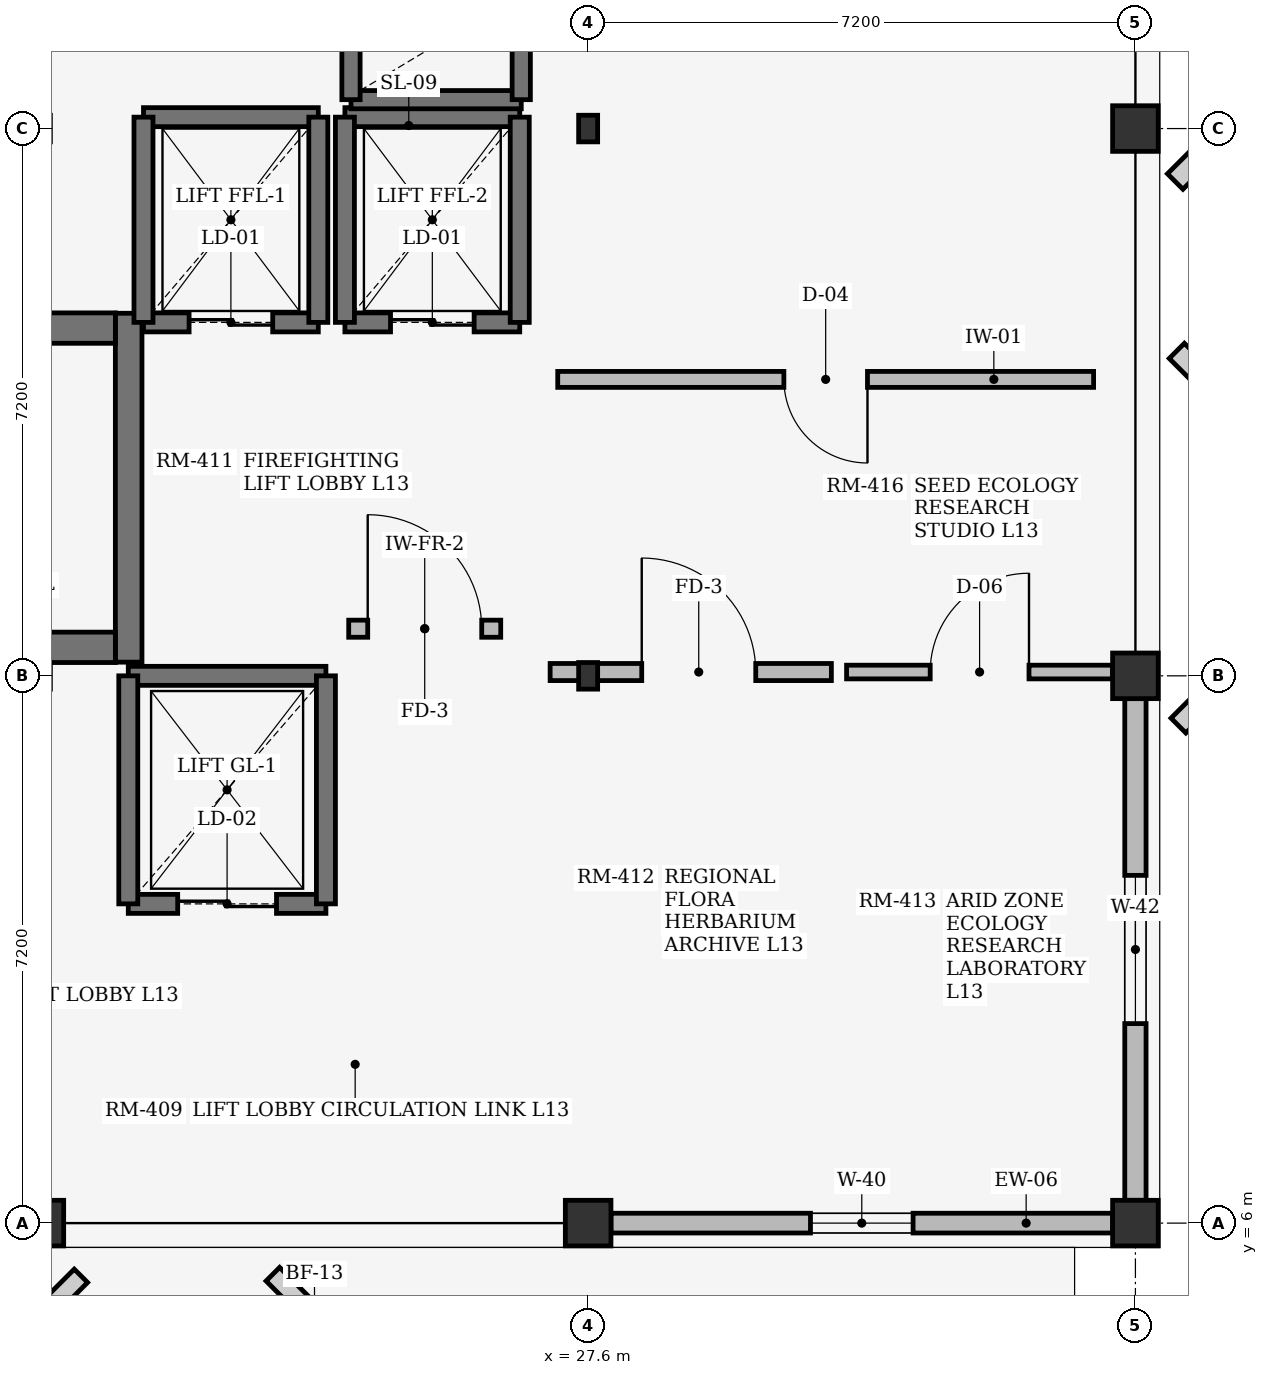
"""IFC4 building model, lengths in metres.
Left out: names, types, materials, properties, quantities, classifications, styles, units other than length and angle.
Written with IfcOpenShell. Run it as: python <this file> out.ifc"""

import sys

from ifc_helpers import new_model, si_unit, direction, frame, frame_2d, origin, origin_2d, place, context, subcontext, project, spatial, rectangle, i_section, extrude, element, fill, save


model = new_model("IFC4")
c1 = context("Model", 3, precision=1e-05, world=origin(), true_north=direction((0.0, 1.0)))
c2 = subcontext(c1, "Body", "Model", "MODEL_VIEW")
j1 = project(units=[si_unit("LENGTHUNIT", "METRE"), si_unit("PLANEANGLEUNIT", "RADIAN")], contexts=[c1])
p1 = place(None, origin())
s1 = spatial("IfcSite", under=j1, at=p1, CompositionType="ELEMENT")
p2 = place(p1, origin())
s2 = spatial("IfcBuilding", under=s1, at=p2, CompositionType="ELEMENT")
p3 = place(p2, frame((0.0, 0.0, 52.2)))
s3 = spatial("IfcBuildingStorey", under=s2, at=p3, CompositionType="ELEMENT", Elevation=52.2)
for number, where, z_axis, x_axis in (
    (1, (20.4, 6.0, 0.0), (0.0, 0.0, 1.0), (1.0, 0.0, 0.0)),
    (2, (27.6, 6.0, 0.0), (0.0, 0.0, 1.0), (1.0, 0.0, 0.0)),
):
    element("IfcColumn", number, at=place(p3, frame(where, z_axis=z_axis, x_axis=x_axis)), inside=s3, PredefinedType="COLUMN", context=c2, shape_type="SweptSolid", body=[
        extrude(rectangle(XDim=0.6, YDim=0.6, at=origin_2d()), origin(), (0.0, 0.0, 1.0), 3.705),
    ])
for number, where, z_axis, x_axis in (
    (3, (27.6, 13.2, 0.0), (0.0, 0.0, 1.0), (1.0, 0.0, 0.0)),
    (4, (27.6, 20.4, 0.0), (0.0, 0.0, 1.0), (1.0, 0.0, 0.0)),
):
    element("IfcColumn", number, at=place(p3, frame(where, z_axis=z_axis, x_axis=x_axis)), inside=s3, PredefinedType="COLUMN", context=c2, shape_type="SweptSolid", body=[
        extrude(i_section(OverallWidth=0.25, OverallDepth=0.35, WebThickness=0.01, FlangeThickness=0.012, at=origin_2d()), origin(), (0.0, 0.0, 1.0), 3.705),
    ])
for number, where, z_axis, x_axis in (
    (5, (34.8, 6.0, 0.0), (0.0, 0.0, 1.0), (1.0, 0.0, 0.0)),
    (6, (34.8, 13.2, 0.0), (0.0, 0.0, 1.0), (1.0, 0.0, 0.0)),
    (7, (34.8, 20.4, 0.0), (0.0, 0.0, 1.0), (1.0, 0.0, 0.0)),
):
    element("IfcColumn", number, at=place(p3, frame(where, z_axis=z_axis, x_axis=x_axis)), inside=s3, PredefinedType="COLUMN", context=c2, shape_type="SweptSolid", body=[
        extrude(rectangle(XDim=0.6, YDim=0.6, at=origin_2d()), origin(), (0.0, 0.0, 1.0), 3.705),
    ])
p4 = place(p3, frame((27.9, 6.0, 0.0), z_axis=(0.0, 0.0, 1.0), x_axis=(1.0, 0.0, 0.0)))
e8 = element("IfcWall", 8, at=p4, inside=s3, PredefinedType="STANDARD", context=c2, shape_type="SweptSolid", body=[
    extrude(rectangle(XDim=6.6, YDim=0.26, at=frame_2d((3.3, 0.0))), origin(), (0.0, 0.0, 1.0), 3.285),
])
p5 = place(p4, frame((2.625, 0.0, 0.75)))
e9 = element("IfcOpeningElement", 9, at=p5, cuts=e8, PredefinedType="OPENING", context=c2, shape_type="SweptSolid", body=[
    extrude(rectangle(XDim=1.35, YDim=1.5, at=frame_2d((0.675, 0.75))), frame((0.0, 0.14, 0.0), z_axis=(0.0, -1.0, 0.0), x_axis=(1.0, 0.0, 0.0)), (0.0, 0.0, 1.0), 0.28),
])
p6 = place(p3, frame((34.8, 6.3, 0.0), z_axis=(0.0, 0.0, 1.0), x_axis=(0.0, 1.0, 0.0)))
e10 = element("IfcWall", 10, at=p6, inside=s3, PredefinedType="STANDARD", context=c2, shape_type="SweptSolid", body=[
    extrude(rectangle(XDim=6.6, YDim=0.28, at=frame_2d((3.3, 0.0))), origin(), (0.0, 0.0, 1.0), 3.285),
])
p7 = place(p6, frame((2.325, 0.0, 0.75)))
e11 = element("IfcOpeningElement", 11, at=p7, cuts=e10, PredefinedType="OPENING", context=c2, shape_type="SweptSolid", body=[
    extrude(rectangle(XDim=1.95, YDim=1.5, at=frame_2d((0.975, 0.75))), frame((0.0, 0.15, 0.0), z_axis=(0.0, -1.0, 0.0), x_axis=(1.0, 0.0, 0.0)), (0.0, 0.0, 1.0), 0.3),
])
p8 = place(p3, frame((21.555, 13.38, 0.0), z_axis=(0.0, 0.0, 1.0), x_axis=(0.0, 1.0, 0.0)))
e12 = element("IfcWall", 12, at=p8, inside=s3, PredefinedType="SHEAR", context=c2, shape_type="SweptSolid", body=[
    extrude(rectangle(XDim=4.59, YDim=0.35, at=frame_2d((2.295, 0.0))), origin(), (0.0, 0.0, 1.0), 3.705),
])
for number, where, z_axis, x_axis in (
    (13, (13.4, 13.575, 0.0), (0.0, 0.0, 1.0), (1.0, 0.0, 0.0)),
    (14, (13.4, 17.775, 0.0), (0.0, 0.0, 1.0), (1.0, 0.0, 0.0)),
):
    element("IfcWall", number, at=place(p3, frame(where, z_axis=z_axis, x_axis=x_axis)), inside=s3, PredefinedType="SHEAR", context=c2, shape_type="SweptSolid", body=[
        extrude(rectangle(XDim=7.98, YDim=0.4, at=frame_2d((3.99, 0.0))), origin(), (0.0, 0.0, 1.0), 3.705),
    ])
p9 = place(p3, frame((21.75, 17.85, 0.0), z_axis=(0.0, 0.0, 1.0), x_axis=(1.0, 0.0, 0.0)))
e15 = element("IfcWall", 15, at=p9, inside=s3, PredefinedType="SHEAR", context=c2, shape_type="SweptSolid", body=[
    extrude(rectangle(XDim=2.3, YDim=0.25, at=frame_2d((1.15, 0.0))), origin(), (0.0, 0.0, 1.0), 3.705),
])
p10 = place(p9, frame((0.6, 0.0, 0.0)))
e16 = element("IfcOpeningElement", 16, at=p10, cuts=e15, PredefinedType="OPENING", context=c2, shape_type="SweptSolid", body=[
    extrude(rectangle(XDim=1.1, YDim=2.2, at=frame_2d((0.55, 1.1))), frame((0.0, 0.135, 0.0), z_axis=(0.0, -1.0, 0.0), x_axis=(1.0, 0.0, 0.0)), (0.0, 0.0, 1.0), 0.27),
])
p11 = place(p3, frame((21.75, 20.55, 0.0), z_axis=(0.0, 0.0, 1.0), x_axis=(1.0, 0.0, 0.0)))
e17 = element("IfcWall", 17, at=p11, inside=s3, PredefinedType="SHEAR", context=c2, shape_type="SweptSolid", body=[
    extrude(rectangle(XDim=2.3, YDim=0.25, at=frame_2d((1.15, 0.0))), origin(), (0.0, 0.0, 1.0), 3.705),
])
for number, where, z_axis, x_axis in (
    (18, (21.75, 17.85, 0.0), (0.0, 0.0, 1.0), (0.0, 1.0, 0.0)),
    (19, (24.05, 17.85, 0.0), (0.0, 0.0, 1.0), (0.0, 1.0, 0.0)),
):
    element("IfcWall", number, at=place(p3, frame(where, z_axis=z_axis, x_axis=x_axis)), inside=s3, PredefinedType="SHEAR", context=c2, shape_type="SweptSolid", body=[
        extrude(rectangle(XDim=2.7, YDim=0.25, at=frame_2d((1.35, 0.0))), origin(), (0.0, 0.0, 1.0), 3.705),
    ])
p12 = place(p3, frame((24.4, 17.85, 0.0), z_axis=(0.0, 0.0, 1.0), x_axis=(1.0, 0.0, 0.0)))
e20 = element("IfcWall", 20, at=p12, inside=s3, PredefinedType="SHEAR", context=c2, shape_type="SweptSolid", body=[
    extrude(rectangle(XDim=2.3, YDim=0.25, at=frame_2d((1.15, 0.0))), origin(), (0.0, 0.0, 1.0), 3.705),
])
p13 = place(p12, frame((0.6, 0.0, 0.0)))
e21 = element("IfcOpeningElement", 21, at=p13, cuts=e20, PredefinedType="OPENING", context=c2, shape_type="SweptSolid", body=[
    extrude(rectangle(XDim=1.1, YDim=2.2, at=frame_2d((0.55, 1.1))), frame((0.0, 0.135, 0.0), z_axis=(0.0, -1.0, 0.0), x_axis=(1.0, 0.0, 0.0)), (0.0, 0.0, 1.0), 0.27),
])
p14 = place(p3, frame((24.4, 20.55, 0.0), z_axis=(0.0, 0.0, 1.0), x_axis=(1.0, 0.0, 0.0)))
e22 = element("IfcWall", 22, at=p14, inside=s3, PredefinedType="SHEAR", context=c2, shape_type="SweptSolid", body=[
    extrude(rectangle(XDim=2.3, YDim=0.25, at=frame_2d((1.15, 0.0))), origin(), (0.0, 0.0, 1.0), 3.705),
])
for number, where, z_axis, x_axis in (
    (23, (24.4, 17.85, 0.0), (0.0, 0.0, 1.0), (0.0, 1.0, 0.0)),
    (24, (26.7, 17.85, 0.0), (0.0, 0.0, 1.0), (0.0, 1.0, 0.0)),
):
    element("IfcWall", number, at=place(p3, frame(where, z_axis=z_axis, x_axis=x_axis)), inside=s3, PredefinedType="SHEAR", context=c2, shape_type="SweptSolid", body=[
        extrude(rectangle(XDim=2.7, YDim=0.25, at=frame_2d((1.35, 0.0))), origin(), (0.0, 0.0, 1.0), 3.705),
    ])
p15 = place(p3, frame((21.55, 10.2, 0.0), z_axis=(0.0, 0.0, 1.0), x_axis=(1.0, 0.0, 0.0)))
e25 = element("IfcWall", 25, at=p15, inside=s3, PredefinedType="SHEAR", context=c2, shape_type="SweptSolid", body=[
    extrude(rectangle(XDim=2.6, YDim=0.25, at=frame_2d((1.3, 0.0))), origin(), (0.0, 0.0, 1.0), 3.705),
])
p16 = place(p15, frame((0.65, 0.0, 0.0)))
e26 = element("IfcOpeningElement", 26, at=p16, cuts=e25, PredefinedType="OPENING", context=c2, shape_type="SweptSolid", body=[
    extrude(rectangle(XDim=1.3, YDim=2.25, at=frame_2d((0.65, 1.125))), frame((0.0, 0.135, 0.0), z_axis=(0.0, -1.0, 0.0), x_axis=(1.0, 0.0, 0.0)), (0.0, 0.0, 1.0), 0.27),
])
p17 = place(p3, frame((21.55, 13.2, 0.0), z_axis=(0.0, 0.0, 1.0), x_axis=(1.0, 0.0, 0.0)))
e27 = element("IfcWall", 27, at=p17, inside=s3, PredefinedType="SHEAR", context=c2, shape_type="SweptSolid", body=[
    extrude(rectangle(XDim=2.6, YDim=0.25, at=frame_2d((1.3, 0.0))), origin(), (0.0, 0.0, 1.0), 3.705),
])
for number, where, z_axis, x_axis in (
    (28, (21.55, 10.2, 0.0), (0.0, 0.0, 1.0), (0.0, 1.0, 0.0)),
    (29, (24.15, 10.2, 0.0), (0.0, 0.0, 1.0), (0.0, 1.0, 0.0)),
):
    element("IfcWall", number, at=place(p3, frame(where, z_axis=z_axis, x_axis=x_axis)), inside=s3, PredefinedType="SHEAR", context=c2, shape_type="SweptSolid", body=[
        extrude(rectangle(XDim=3.0, YDim=0.25, at=frame_2d((1.5, 0.0))), origin(), (0.0, 0.0, 1.0), 3.705),
    ])
p18 = place(p3, frame((24.48, 20.78, 0.0), z_axis=(0.0, 0.0, 1.0), x_axis=(1.0, 0.0, 0.0)))
e30 = element("IfcWall", 30, at=p18, inside=s3, PredefinedType="SHEAR", context=c2, shape_type="SweptSolid", body=[
    extrude(rectangle(XDim=2.24, YDim=0.24, at=frame_2d((1.12, 0.0))), origin(), (0.0, 0.0, 1.0), 3.705),
])
for number, where, z_axis, x_axis in (
    (31, (24.48, 20.78, 0.0), (0.0, 0.0, 1.0), (0.0, 1.0, 0.0)),
    (32, (26.72, 20.78, 0.0), (0.0, 0.0, 1.0), (0.0, 1.0, 0.0)),
):
    element("IfcWall", number, at=place(p3, frame(where, z_axis=z_axis, x_axis=x_axis)), inside=s3, PredefinedType="SHEAR", context=c2, shape_type="SweptSolid", body=[
        extrude(rectangle(XDim=2.94, YDim=0.24, at=frame_2d((1.47, 0.0))), origin(), (0.0, 0.0, 1.0), 3.705),
    ])
p19 = place(p3, frame((24.45, 13.82, 0.0), z_axis=(0.0, 0.0, 1.0), x_axis=(1.0, 0.0, 0.0)))
e33 = element("IfcWall", 33, at=p19, inside=s3, PredefinedType="SOLIDWALL", context=c2, shape_type="SweptSolid", body=[
    extrude(rectangle(XDim=2.0, YDim=0.225, at=frame_2d((1.0, 0.0))), origin(), (0.0, 0.0, 1.0), 3.685),
])
p20 = place(p19, frame((0.25, 0.0, 0.0)))
e34 = element("IfcOpeningElement", 34, at=p20, cuts=e33, PredefinedType="OPENING", context=c2, shape_type="SweptSolid", body=[
    extrude(rectangle(XDim=1.5, YDim=2.2, at=frame_2d((0.75, 1.1))), frame((0.0, 0.123, 0.0), z_axis=(0.0, -1.0, 0.0), x_axis=(1.0, 0.0, 0.0)), (0.0, 0.0, 1.0), 0.245),
])
p21 = place(p3, frame((27.2, 17.1, 0.0), z_axis=(0.0, 0.0, 1.0), x_axis=(1.0, 0.0, 0.0)))
e35 = element("IfcWall", 35, at=p21, inside=s3, PredefinedType="PARTITIONING", context=c2, shape_type="SweptSolid", body=[
    extrude(rectangle(XDim=7.05, YDim=0.21, at=frame_2d((3.525, 0.0))), origin(), (0.0, 0.0, 1.0), 3.685),
])
p22 = place(p21, frame((2.975, 0.0, 0.0)))
e36 = element("IfcOpeningElement", 36, at=p22, cuts=e35, PredefinedType="OPENING", context=c2, shape_type="SweptSolid", body=[
    extrude(rectangle(XDim=1.1, YDim=2.2, at=frame_2d((0.55, 1.1))), frame((0.0, 0.115, 0.0), z_axis=(0.0, -1.0, 0.0), x_axis=(1.0, 0.0, 0.0)), (0.0, 0.0, 1.0), 0.23),
])
p23 = place(p3, frame((27.1, 13.25, 0.0), z_axis=(0.0, 0.0, 1.0), x_axis=(1.0, 0.0, 0.0)))
e37 = element("IfcWall", 37, at=p23, inside=s3, PredefinedType="SOLIDWALL", context=c2, shape_type="SweptSolid", body=[
    extrude(rectangle(XDim=3.7, YDim=0.225, at=frame_2d((1.85, 0.0))), origin(), (0.0, 0.0, 1.0), 3.295),
])
p24 = place(p23, frame((1.205, 0.0, 0.0)))
e38 = element("IfcOpeningElement", 38, at=p24, cuts=e37, PredefinedType="OPENING", context=c2, shape_type="SweptSolid", body=[
    extrude(rectangle(XDim=1.5, YDim=2.2, at=frame_2d((0.75, 1.1))), frame((0.0, 0.123, 0.0), z_axis=(0.0, -1.0, 0.0), x_axis=(1.0, 0.0, 0.0)), (0.0, 0.0, 1.0), 0.245),
])
p25 = place(p3, frame((31.0, 13.25, 0.0), z_axis=(0.0, 0.0, 1.0), x_axis=(1.0, 0.0, 0.0)))
e39 = element("IfcWall", 39, at=p25, inside=s3, PredefinedType="PARTITIONING", context=c2, shape_type="SweptSolid", body=[
    extrude(rectangle(XDim=3.5, YDim=0.18, at=frame_2d((1.75, 0.0))), origin(), (0.0, 0.0, 1.0), 3.295),
])
p26 = place(p25, frame((1.1, 0.0, 0.0)))
e40 = element("IfcOpeningElement", 40, at=p26, cuts=e39, PredefinedType="OPENING", context=c2, shape_type="SweptSolid", body=[
    extrude(rectangle(XDim=1.3, YDim=2.2, at=frame_2d((0.65, 1.1))), frame((0.0, 0.1, 0.0), z_axis=(0.0, -1.0, 0.0), x_axis=(1.0, 0.0, 0.0)), (0.0, 0.0, 1.0), 0.2),
])
p27 = place(p5, origin())
e41 = element("IfcWindow", 41, at=p27, inside=s3, PartitioningType="SINGLE_PANEL", PredefinedType="WINDOW", context=c2, shape_type="SweptSolid", body=[
    extrude(rectangle(XDim=1.35, YDim=1.5, at=frame_2d((0.675, 0.75))), frame((0.0, 0.03, 0.0), z_axis=(0.0, -1.0, 0.0), x_axis=(1.0, 0.0, 0.0)), (0.0, 0.0, 1.0), 0.06),
])
fill(e9, e41)
p28 = place(p7, origin())
e42 = element("IfcWindow", 42, at=p28, inside=s3, PartitioningType="SINGLE_PANEL", PredefinedType="WINDOW", context=c2, shape_type="SweptSolid", body=[
    extrude(rectangle(XDim=1.95, YDim=1.5, at=frame_2d((0.975, 0.75))), frame((0.0, 0.03, 0.0), z_axis=(0.0, -1.0, 0.0), x_axis=(1.0, 0.0, 0.0)), (0.0, 0.0, 1.0), 0.06),
])
fill(e11, e42)
p29 = place(p10, origin())
e43 = element("IfcDoor", 43, at=p29, inside=s3, OperationType="DOUBLE_DOOR_SLIDING", PredefinedType="DOOR", context=c2, shape_type="SweptSolid", body=[
    extrude(rectangle(XDim=1.1, YDim=2.2, at=frame_2d((0.55, 1.1))), frame((0.0, 0.025, 0.0), z_axis=(0.0, -1.0, 0.0), x_axis=(1.0, 0.0, 0.0)), (0.0, 0.0, 1.0), 0.05),
])
fill(e16, e43)
p30 = place(p13, origin())
e44 = element("IfcDoor", 44, at=p30, inside=s3, OperationType="DOUBLE_DOOR_SLIDING", PredefinedType="DOOR", context=c2, shape_type="SweptSolid", body=[
    extrude(rectangle(XDim=1.1, YDim=2.2, at=frame_2d((0.55, 1.1))), frame((0.0, 0.025, 0.0), z_axis=(0.0, -1.0, 0.0), x_axis=(1.0, 0.0, 0.0)), (0.0, 0.0, 1.0), 0.05),
])
fill(e21, e44)
p31 = place(p16, origin())
e45 = element("IfcDoor", 45, at=p31, inside=s3, OperationType="DOUBLE_DOOR_SLIDING", PredefinedType="DOOR", context=c2, shape_type="SweptSolid", body=[
    extrude(rectangle(XDim=1.3, YDim=2.25, at=frame_2d((0.65, 1.125))), frame((0.0, 0.025, 0.0), z_axis=(0.0, -1.0, 0.0), x_axis=(1.0, 0.0, 0.0)), (0.0, 0.0, 1.0), 0.05),
])
fill(e26, e45)
p32 = place(p20, origin())
e46 = element("IfcDoor", 46, at=p32, inside=s3, OperationType="SINGLE_SWING_LEFT", PredefinedType="DOOR", context=c2, shape_type="SweptSolid", body=[
    extrude(rectangle(XDim=1.5, YDim=2.2, at=frame_2d((0.75, 1.1))), frame((0.0, 0.025, 0.0), z_axis=(0.0, -1.0, 0.0), x_axis=(1.0, 0.0, 0.0)), (0.0, 0.0, 1.0), 0.05),
])
fill(e34, e46)
p33 = place(p22, origin())
e47 = element("IfcDoor", 47, at=p33, inside=s3, OperationType="SINGLE_SWING_RIGHT", PredefinedType="DOOR", context=c2, shape_type="SweptSolid", body=[
    extrude(rectangle(XDim=1.1, YDim=2.2, at=frame_2d((0.55, 1.1))), frame((0.0, 0.025, 0.0), z_axis=(0.0, -1.0, 0.0), x_axis=(1.0, 0.0, 0.0)), (0.0, 0.0, 1.0), 0.05),
])
fill(e36, e47)
p34 = place(p24, origin())
e48 = element("IfcDoor", 48, at=p34, inside=s3, OperationType="SINGLE_SWING_LEFT", PredefinedType="DOOR", context=c2, shape_type="SweptSolid", body=[
    extrude(rectangle(XDim=1.5, YDim=2.2, at=frame_2d((0.75, 1.1))), frame((0.0, 0.025, 0.0), z_axis=(0.0, -1.0, 0.0), x_axis=(1.0, 0.0, 0.0)), (0.0, 0.0, 1.0), 0.05),
])
fill(e38, e48)
p35 = place(p26, frame((1.3, 0.0, 0.0), z_axis=(0.0, 0.0, 1.0), x_axis=(-1.0, 0.0, 0.0)))
e49 = element("IfcDoor", 49, at=p35, inside=s3, OperationType="SINGLE_SWING_RIGHT", PredefinedType="DOOR", context=c2, shape_type="SweptSolid", body=[
    extrude(rectangle(XDim=1.3, YDim=2.2, at=frame_2d((0.65, 1.1))), frame((0.0, 0.025, 0.0), z_axis=(0.0, -1.0, 0.0), x_axis=(1.0, 0.0, 0.0)), (0.0, 0.0, 1.0), 0.05),
])
fill(e40, e49)
save(model, sys.argv[1])
